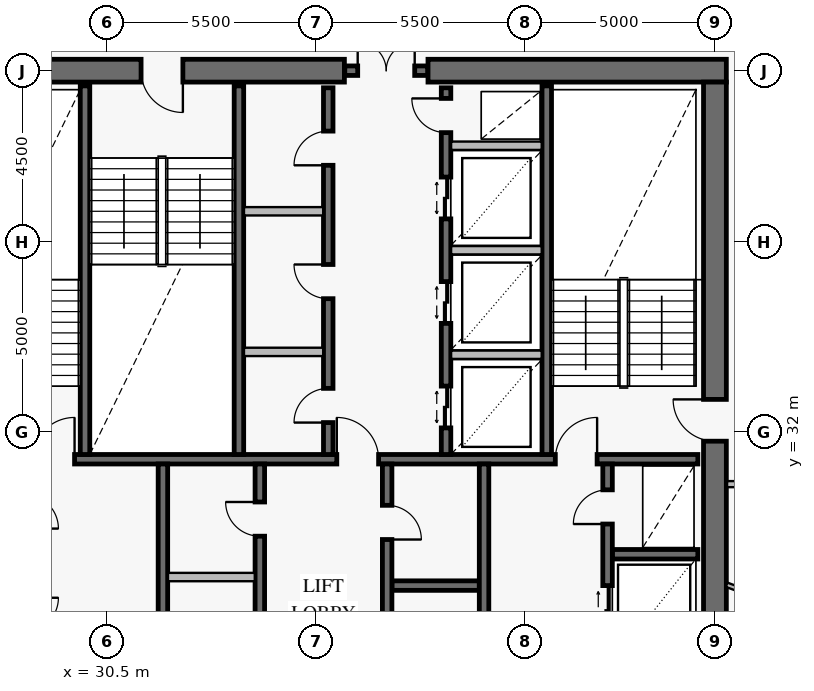
"""IFC4 building model, lengths in metres.
Left out: names, types, materials, properties, quantities, classifications, styles, units other than length and angle.
Written with IfcOpenShell. Run it as: python <this file> out.ifc"""

import sys

from ifc_helpers import new_model, si_unit, direction, frame, frame_2d, origin, place, context, subcontext, project, spatial, rectangle, extrude, element, fill, save


model = new_model("IFC4")
c1 = context("Model", 3, precision=1e-05, world=origin(), true_north=direction((0.0, 1.0)))
c2 = subcontext(c1, "Body", "Model", "MODEL_VIEW")
j1 = project(units=[si_unit("LENGTHUNIT", "METRE"), si_unit("PLANEANGLEUNIT", "RADIAN")], contexts=[c1])
p1 = place(None, origin())
s1 = spatial("IfcSite", under=j1, at=p1, CompositionType="ELEMENT")
p2 = place(p1, origin())
s2 = spatial("IfcBuilding", under=s1, at=p2, CompositionType="ELEMENT")
p3 = place(p2, frame((0.0, 0.0, 254.0)))
s3 = spatial("IfcBuildingStorey", under=s2, at=p3, CompositionType="ELEMENT", Elevation=254.0)
p4 = place(p3, frame((46.8, 41.5, 0.0), z_axis=(0.0, 0.0, 1.0), x_axis=(-1.0, 0.0, 0.0)))
e1 = element("IfcWall", 1, at=p4, inside=s3, PredefinedType="SHEAR", context=c2, shape_type="SweptSolid", body=[
    extrude(rectangle(XDim=7.85, YDim=0.6, at=frame_2d((3.925, 0.0))), origin(), (0.0, 0.0, 1.0), 3.8),
])
p5 = place(p3, frame((36.75, 41.5, 0.0), z_axis=(0.0, 0.0, 1.0), x_axis=(-1.0, 0.0, 0.0)))
e2 = element("IfcWall", 2, at=p5, inside=s3, PredefinedType="SHEAR", context=c2, shape_type="SweptSolid", body=[
    extrude(rectangle(XDim=11.55, YDim=0.6, at=frame_2d((5.775, 0.0))), origin(), (0.0, 0.0, 1.0), 3.8),
])
p6 = place(p5, frame((4.25, 0.0, 0.0)))
e3 = element("IfcOpeningElement", 3, at=p6, cuts=e2, PredefinedType="OPENING", context=c2, shape_type="SweptSolid", body=[
    extrude(rectangle(XDim=1.1, YDim=2.15, at=frame_2d((0.55, 1.075))), frame((0.0, 0.312, 0.0), z_axis=(0.0, -1.0, 0.0), x_axis=(1.0, 0.0, 0.0)), (0.0, 0.0, 1.0), 0.624),
])
p7 = place(p3, frame((46.5, 22.8, 0.0), z_axis=(0.0, 0.0, 1.0), x_axis=(0.0, 1.0, 0.0)))
e4 = element("IfcWall", 4, at=p7, inside=s3, PredefinedType="SHEAR", context=c2, shape_type="SweptSolid", body=[
    extrude(rectangle(XDim=18.4, YDim=0.6, at=frame_2d((9.2, 0.0))), origin(), (0.0, 0.0, 1.0), 3.8),
])
p8 = place(p7, frame((8.95, 0.0, 0.0)))
e5 = element("IfcOpeningElement", 5, at=p8, cuts=e4, PredefinedType="OPENING", context=c2, shape_type="SweptSolid", body=[
    extrude(rectangle(XDim=1.1, YDim=2.15, at=frame_2d((0.55, 1.075))), frame((0.0, 0.312, 0.0), z_axis=(0.0, -1.0, 0.0), x_axis=(1.0, 0.0, 0.0)), (0.0, 0.0, 1.0), 0.624),
])
p9 = place(p3, frame((36.76, 41.5, 0.0), z_axis=(0.0, 0.0, 1.0), x_axis=(1.0, 0.0, 0.0)))
e6 = element("IfcWall", 6, at=p9, inside=s3, PredefinedType="SOLIDWALL", context=c2, shape_type="SweptSolid", body=[
    extrude(rectangle(XDim=2.18, YDim=0.25, at=frame_2d((1.09, 0.0))), origin(), (0.0, 0.0, 1.0), 3.8),
])
p10 = place(p9, frame((0.34, 0.0, 0.0)))
e7 = element("IfcOpeningElement", 7, at=p10, cuts=e6, PredefinedType="OPENING", context=c2, shape_type="SweptSolid", body=[
    extrude(rectangle(XDim=1.5, YDim=2.15, at=frame_2d((0.75, 1.075))), frame((0.0, 0.137, 0.0), z_axis=(0.0, -1.0, 0.0), x_axis=(1.0, 0.0, 0.0)), (0.0, 0.0, 1.0), 0.274),
])
p11 = place(p3, frame((25.95, 31.275, 0.0), z_axis=(0.0, 0.0, 1.0), x_axis=(1.0, 0.0, 0.0)))
e8 = element("IfcWall", 8, at=p11, inside=s3, PredefinedType="SOLIDWALL", context=c2, shape_type="SweptSolid", body=[
    extrude(rectangle(XDim=20.1, YDim=0.25, at=frame_2d((10.05, 0.0))), origin(), (0.0, 0.0, 1.0), 3.8),
])
p12 = place(p11, frame((2.6, 0.0, 0.0)))
e9 = element("IfcOpeningElement", 9, at=p12, cuts=e8, PredefinedType="OPENING", context=c2, shape_type="SweptSolid", body=[
    extrude(rectangle(XDim=1.1, YDim=2.15, at=frame_2d((0.55, 1.075))), frame((0.0, 0.137, 0.0), z_axis=(0.0, -1.0, 0.0), x_axis=(1.0, 0.0, 0.0)), (0.0, 0.0, 1.0), 0.274),
])
p13 = place(p11, frame((10.6, 0.0, 0.0)))
e10 = element("IfcOpeningElement", 10, at=p13, cuts=e8, PredefinedType="OPENING", context=c2, shape_type="SweptSolid", body=[
    extrude(rectangle(XDim=1.1, YDim=2.15, at=frame_2d((0.55, 1.075))), frame((0.0, 0.137, 0.0), z_axis=(0.0, -1.0, 0.0), x_axis=(1.0, 0.0, 0.0)), (0.0, 0.0, 1.0), 0.274),
])
p14 = place(p11, frame((16.35, 0.0, 0.0)))
e11 = element("IfcOpeningElement", 11, at=p14, cuts=e8, PredefinedType="OPENING", context=c2, shape_type="SweptSolid", body=[
    extrude(rectangle(XDim=1.1, YDim=2.15, at=frame_2d((0.55, 1.075))), frame((0.0, 0.137, 0.0), z_axis=(0.0, -1.0, 0.0), x_axis=(1.0, 0.0, 0.0)), (0.0, 0.0, 1.0), 0.274),
])
for number, where, z_axis, x_axis in (
    (12, (29.925, 31.4, 0.0), (0.0, 0.0, 1.0), (0.0, 1.0, 0.0)),
    (13, (33.975, 31.4, 0.0), (0.0, 0.0, 1.0), (0.0, 1.0, 0.0)),
    (14, (42.075, 31.4, 0.0), (0.0, 0.0, 1.0), (0.0, 1.0, 0.0)),
):
    element("IfcWall", number, at=place(p3, frame(where, z_axis=z_axis, x_axis=x_axis)), inside=s3, PredefinedType="SOLIDWALL", context=c2, shape_type="SweptSolid", body=[
        extrude(rectangle(XDim=9.7, YDim=0.25, at=frame_2d((4.85, 0.0))), origin(), (0.0, 0.0, 1.0), 3.8),
    ])
p15 = place(p3, frame((36.325, 31.4, 0.0), z_axis=(0.0, 0.0, 1.0), x_axis=(0.0, 1.0, 0.0)))
e15 = element("IfcWall", 15, at=p15, inside=s3, PredefinedType="SOLIDWALL", context=c2, shape_type="SweptSolid", body=[
    extrude(rectangle(XDim=9.65, YDim=0.25, at=frame_2d((4.825, 0.0))), origin(), (0.0, 0.0, 1.0), 3.8),
])
p16 = place(p15, frame((0.84, 0.0, 0.0)))
e16 = element("IfcOpeningElement", 16, at=p16, cuts=e15, PredefinedType="OPENING", context=c2, shape_type="SweptSolid", body=[
    extrude(rectangle(XDim=0.9, YDim=2.1, at=frame_2d((0.45, 1.05))), frame((0.0, 0.137, 0.0), z_axis=(0.0, -1.0, 0.0), x_axis=(1.0, 0.0, 0.0)), (0.0, 0.0, 1.0), 0.274),
])
p17 = place(p15, frame((4.1, 0.0, 0.0)))
e17 = element("IfcOpeningElement", 17, at=p17, cuts=e15, PredefinedType="OPENING", context=c2, shape_type="SweptSolid", body=[
    extrude(rectangle(XDim=0.9, YDim=2.1, at=frame_2d((0.45, 1.05))), frame((0.0, 0.137, 0.0), z_axis=(0.0, -1.0, 0.0), x_axis=(1.0, 0.0, 0.0)), (0.0, 0.0, 1.0), 0.274),
])
p18 = place(p15, frame((7.61, 0.0, 0.0)))
e18 = element("IfcOpeningElement", 18, at=p18, cuts=e15, PredefinedType="OPENING", context=c2, shape_type="SweptSolid", body=[
    extrude(rectangle(XDim=0.9, YDim=2.1, at=frame_2d((0.45, 1.05))), frame((0.0, 0.137, 0.0), z_axis=(0.0, -1.0, 0.0), x_axis=(1.0, 0.0, 0.0)), (0.0, 0.0, 1.0), 0.274),
])
p19 = place(p3, frame((39.425, 31.4, 0.0), z_axis=(0.0, 0.0, 1.0), x_axis=(0.0, 1.0, 0.0)))
e19 = element("IfcWall", 19, at=p19, inside=s3, PredefinedType="SOLIDWALL", context=c2, shape_type="SweptSolid", body=[
    extrude(rectangle(XDim=9.65, YDim=0.25, at=frame_2d((4.825, 0.0))), origin(), (0.0, 0.0, 1.0), 3.8),
])
p20 = place(p19, frame((0.7, 0.0, 0.0)))
e20 = element("IfcOpeningElement", 20, at=p20, cuts=e19, PredefinedType="OPENING", context=c2, shape_type="SweptSolid", body=[
    extrude(rectangle(XDim=1.1, YDim=2.2, at=frame_2d((0.55, 1.1))), frame((0.0, 0.137, 0.0), z_axis=(0.0, -1.0, 0.0), x_axis=(1.0, 0.0, 0.0)), (0.0, 0.0, 1.0), 0.274),
])
p21 = place(p19, frame((3.45, 0.0, 0.0)))
e21 = element("IfcOpeningElement", 21, at=p21, cuts=e19, PredefinedType="OPENING", context=c2, shape_type="SweptSolid", body=[
    extrude(rectangle(XDim=1.1, YDim=2.2, at=frame_2d((0.55, 1.1))), frame((0.0, 0.137, 0.0), z_axis=(0.0, -1.0, 0.0), x_axis=(1.0, 0.0, 0.0)), (0.0, 0.0, 1.0), 0.274),
])
p22 = place(p19, frame((6.2, 0.0, 0.0)))
e22 = element("IfcOpeningElement", 22, at=p22, cuts=e19, PredefinedType="OPENING", context=c2, shape_type="SweptSolid", body=[
    extrude(rectangle(XDim=1.1, YDim=2.2, at=frame_2d((0.55, 1.1))), frame((0.0, 0.137, 0.0), z_axis=(0.0, -1.0, 0.0), x_axis=(1.0, 0.0, 0.0)), (0.0, 0.0, 1.0), 0.274),
])
p23 = place(p19, frame((8.47, 0.0, 0.0)))
e23 = element("IfcOpeningElement", 23, at=p23, cuts=e19, PredefinedType="OPENING", context=c2, shape_type="SweptSolid", body=[
    extrude(rectangle(XDim=0.9, YDim=2.1, at=frame_2d((0.45, 1.05))), frame((0.0, 0.137, 0.0), z_axis=(0.0, -1.0, 0.0), x_axis=(1.0, 0.0, 0.0)), (0.0, 0.0, 1.0), 0.274),
])
p24 = place(p3, frame((31.975, 22.95, 0.0), z_axis=(0.0, 0.0, 1.0), x_axis=(0.0, 1.0, 0.0)))
e24 = element("IfcWall", 24, at=p24, inside=s3, PredefinedType="SOLIDWALL", context=c2, shape_type="SweptSolid", body=[
    extrude(rectangle(XDim=8.2, YDim=0.25, at=frame_2d((4.1, 0.0))), origin(), (0.0, 0.0, 1.0), 3.8),
])
p25 = place(p3, frame((34.525, 22.95, 0.0), z_axis=(0.0, 0.0, 1.0), x_axis=(0.0, 1.0, 0.0)))
e25 = element("IfcWall", 25, at=p25, inside=s3, PredefinedType="SOLIDWALL", context=c2, shape_type="SweptSolid", body=[
    extrude(rectangle(XDim=8.2, YDim=0.25, at=frame_2d((4.1, 0.0))), origin(), (0.0, 0.0, 1.0), 3.8),
])
p26 = place(p25, frame((2.1, 0.0, 0.0)))
e26 = element("IfcOpeningElement", 26, at=p26, cuts=e25, PredefinedType="OPENING", context=c2, shape_type="SweptSolid", body=[
    extrude(rectangle(XDim=0.9, YDim=2.1, at=frame_2d((0.45, 1.05))), frame((0.0, 0.137, 0.0), z_axis=(0.0, -1.0, 0.0), x_axis=(1.0, 0.0, 0.0)), (0.0, 0.0, 1.0), 0.274),
])
p27 = place(p25, frame((6.3, 0.0, 0.0)))
e27 = element("IfcOpeningElement", 27, at=p27, cuts=e25, PredefinedType="OPENING", context=c2, shape_type="SweptSolid", body=[
    extrude(rectangle(XDim=0.9, YDim=2.1, at=frame_2d((0.45, 1.05))), frame((0.0, 0.137, 0.0), z_axis=(0.0, -1.0, 0.0), x_axis=(1.0, 0.0, 0.0)), (0.0, 0.0, 1.0), 0.274),
])
p28 = place(p3, frame((38.0, 27.95, 0.0), z_axis=(0.0, 0.0, 1.0), x_axis=(1.0, 0.0, 0.0)))
e28 = element("IfcWall", 28, at=p28, inside=s3, PredefinedType="SOLIDWALL", context=c2, shape_type="SweptSolid", body=[
    extrude(rectangle(XDim=2.3, YDim=0.25, at=frame_2d((1.15, 0.0))), origin(), (0.0, 0.0, 1.0), 3.8),
])
p29 = place(p3, frame((37.875, 22.95, 0.0), z_axis=(0.0, 0.0, 1.0), x_axis=(0.0, 1.0, 0.0)))
e29 = element("IfcWall", 29, at=p29, inside=s3, PredefinedType="SOLIDWALL", context=c2, shape_type="SweptSolid", body=[
    extrude(rectangle(XDim=8.2, YDim=0.25, at=frame_2d((4.1, 0.0))), origin(), (0.0, 0.0, 1.0), 3.8),
])
p30 = place(p29, frame((2.012, 0.0, 0.0)))
e30 = element("IfcOpeningElement", 30, at=p30, cuts=e29, PredefinedType="OPENING", context=c2, shape_type="SweptSolid", body=[
    extrude(rectangle(XDim=0.9, YDim=2.1, at=frame_2d((0.45, 1.05))), frame((0.0, 0.137, 0.0), z_axis=(0.0, -1.0, 0.0), x_axis=(1.0, 0.0, 0.0)), (0.0, 0.0, 1.0), 0.274),
])
p31 = place(p29, frame((6.212, 0.0, 0.0)))
e31 = element("IfcOpeningElement", 31, at=p31, cuts=e29, PredefinedType="OPENING", context=c2, shape_type="SweptSolid", body=[
    extrude(rectangle(XDim=0.9, YDim=2.1, at=frame_2d((0.45, 1.05))), frame((0.0, 0.137, 0.0), z_axis=(0.0, -1.0, 0.0), x_axis=(1.0, 0.0, 0.0)), (0.0, 0.0, 1.0), 0.274),
])
p32 = place(p3, frame((40.425, 22.95, 0.0), z_axis=(0.0, 0.0, 1.0), x_axis=(0.0, 1.0, 0.0)))
e32 = element("IfcWall", 32, at=p32, inside=s3, PredefinedType="SOLIDWALL", context=c2, shape_type="SweptSolid", body=[
    extrude(rectangle(XDim=8.2, YDim=0.25, at=frame_2d((4.1, 0.0))), origin(), (0.0, 0.0, 1.0), 3.8),
])
p33 = place(p3, frame((43.8, 28.775, 0.0), z_axis=(0.0, 0.0, 1.0), x_axis=(1.0, 0.0, 0.0)))
e33 = element("IfcWall", 33, at=p33, inside=s3, PredefinedType="SOLIDWALL", context=c2, shape_type="SweptSolid", body=[
    extrude(rectangle(XDim=2.25, YDim=0.25, at=frame_2d((1.125, 0.0))), origin(), (0.0, 0.0, 1.0), 3.8),
])
p34 = place(p3, frame((43.675, 22.95, 0.0), z_axis=(0.0, 0.0, 1.0), x_axis=(0.0, 1.0, 0.0)))
e34 = element("IfcWall", 34, at=p34, inside=s3, PredefinedType="SOLIDWALL", context=c2, shape_type="SweptSolid", body=[
    extrude(rectangle(XDim=8.2, YDim=0.25, at=frame_2d((4.1, 0.0))), origin(), (0.0, 0.0, 1.0), 3.8),
])
p35 = place(p34, frame((0.75, 0.0, 0.0)))
e35 = element("IfcOpeningElement", 35, at=p35, cuts=e34, PredefinedType="OPENING", context=c2, shape_type="SweptSolid", body=[
    extrude(rectangle(XDim=1.3, YDim=2.3, at=frame_2d((0.65, 1.15))), frame((0.0, 0.137, 0.0), z_axis=(0.0, -1.0, 0.0), x_axis=(1.0, 0.0, 0.0)), (0.0, 0.0, 1.0), 0.274),
])
p36 = place(p34, frame((3.7, 0.0, 0.0)))
e36 = element("IfcOpeningElement", 36, at=p36, cuts=e34, PredefinedType="OPENING", context=c2, shape_type="SweptSolid", body=[
    extrude(rectangle(XDim=1.3, YDim=2.3, at=frame_2d((0.65, 1.15))), frame((0.0, 0.137, 0.0), z_axis=(0.0, -1.0, 0.0), x_axis=(1.0, 0.0, 0.0)), (0.0, 0.0, 1.0), 0.274),
])
p37 = place(p34, frame((6.62, 0.0, 0.0)))
e37 = element("IfcOpeningElement", 37, at=p37, cuts=e34, PredefinedType="OPENING", context=c2, shape_type="SweptSolid", body=[
    extrude(rectangle(XDim=0.9, YDim=2.1, at=frame_2d((0.45, 1.05))), frame((0.0, 0.137, 0.0), z_axis=(0.0, -1.0, 0.0), x_axis=(1.0, 0.0, 0.0)), (0.0, 0.0, 1.0), 0.274),
])
p38 = place(p3, frame((46.808, 27.972, 0.0), z_axis=(0.0, 0.0, 1.0), x_axis=(0.937036038674, -0.349232676344, 0.0)))
e38 = element("IfcWall", 38, at=p38, inside=s3, PredefinedType="PARTITIONING", context=c2, shape_type="SweptSolid", body=[
    extrude(rectangle(XDim=4.657, YDim=0.12, at=frame_2d((2.329, 0.0))), origin(), (0.0, 0.0, 1.0), 3.55),
])
p39 = place(p38, frame((1.487, 0.0, 0.0)))
e39 = element("IfcOpeningElement", 39, at=p39, cuts=e38, PredefinedType="OPENING", context=c2, shape_type="SweptSolid", body=[
    extrude(rectangle(XDim=0.9, YDim=2.1, at=frame_2d((0.45, 1.05))), frame((0.0, 0.072, 0.0), z_axis=(0.0, -1.0, 0.0), x_axis=(1.0, 0.0, 0.0)), (0.0, 0.0, 1.0), 0.144),
])
p40 = place(p3, frame((46.82, 30.62, 0.0), z_axis=(0.0, 0.0, 1.0), x_axis=(1.0, 0.0, 0.0)))
e40 = element("IfcWall", 40, at=p40, inside=s3, PredefinedType="PARTITIONING", context=c2, shape_type="SweptSolid", body=[
    extrude(rectangle(XDim=2.03, YDim=0.16, at=frame_2d((1.015, 0.0))), origin(), (0.0, 0.0, 1.0), 3.55),
])
p41 = place(p40, frame((0.49, 0.0, 0.0)))
e41 = element("IfcOpeningElement", 41, at=p41, cuts=e40, PredefinedType="OPENING", context=c2, shape_type="SweptSolid", body=[
    extrude(rectangle(XDim=1.05, YDim=2.15, at=frame_2d((0.525, 1.075))), frame((0.0, 0.092, 0.0), z_axis=(0.0, -1.0, 0.0), x_axis=(1.0, 0.0, 0.0)), (0.0, 0.0, 1.0), 0.184),
])
for number, where, z_axis, x_axis in (
    (42, (34.108, 34.1, 0.0), (0.0, 0.0, 1.0), (1.0, 0.0, 0.0)),
    (43, (34.108, 37.8, 0.0), (0.0, 0.0, 1.0), (1.0, 0.0, 0.0)),
):
    element("IfcWall", number, at=place(p3, frame(where, z_axis=z_axis, x_axis=x_axis)), inside=s3, PredefinedType="PARTITIONING", context=c2, shape_type="SweptSolid", body=[
        extrude(rectangle(XDim=2.084, YDim=0.22, at=frame_2d((1.042, 0.0))), origin(), (0.0, 0.0, 1.0), 3.55),
    ])
for number, where, z_axis, x_axis in (
    (44, (39.558, 34.025, 0.0), (0.0, 0.0, 1.0), (1.0, 0.0, 0.0)),
    (45, (39.558, 36.775, 0.0), (0.0, 0.0, 1.0), (1.0, 0.0, 0.0)),
    (46, (39.558, 39.525, 0.0), (0.0, 0.0, 1.0), (1.0, 0.0, 0.0)),
):
    element("IfcWall", number, at=place(p3, frame(where, z_axis=z_axis, x_axis=x_axis)), inside=s3, PredefinedType="PARTITIONING", context=c2, shape_type="SweptSolid", body=[
        extrude(rectangle(XDim=2.384, YDim=0.22, at=frame_2d((1.192, 0.0))), origin(), (0.0, 0.0, 1.0), 3.55),
    ])
p42 = place(p3, frame((32.108, 28.175, 0.0), z_axis=(0.0, 0.0, 1.0), x_axis=(1.0, 0.0, 0.0)))
e47 = element("IfcWall", 47, at=p42, inside=s3, PredefinedType="PARTITIONING", context=c2, shape_type="SweptSolid", body=[
    extrude(rectangle(XDim=2.284, YDim=0.22, at=frame_2d((1.142, 0.0))), origin(), (0.0, 0.0, 1.0), 3.55),
])
p43 = place(p8, origin())
e48 = element("IfcDoor", 48, at=p43, inside=s3, OperationType="SINGLE_SWING_RIGHT", PredefinedType="USERDEFINED", context=c2, shape_type="SweptSolid", body=[
    extrude(rectangle(XDim=1.1, YDim=2.15, at=frame_2d((0.55, 1.075))), frame((0.0, 0.025, 0.0), z_axis=(0.0, -1.0, 0.0), x_axis=(1.0, 0.0, 0.0)), (0.0, 0.0, 1.0), 0.05),
])
fill(e5, e48)
p44 = place(p6, origin())
e49 = element("IfcDoor", 49, at=p44, inside=s3, OperationType="SINGLE_SWING_LEFT", PredefinedType="USERDEFINED", context=c2, shape_type="SweptSolid", body=[
    extrude(rectangle(XDim=1.1, YDim=2.15, at=frame_2d((0.55, 1.075))), frame((0.0, 0.025, 0.0), z_axis=(0.0, -1.0, 0.0), x_axis=(1.0, 0.0, 0.0)), (0.0, 0.0, 1.0), 0.05),
])
fill(e3, e49)
p45 = place(p10, origin())
e50 = element("IfcDoor", 50, at=p45, inside=s3, OperationType="DOUBLE_DOOR_SINGLE_SWING", PredefinedType="DOOR", context=c2, shape_type="SweptSolid", body=[
    extrude(rectangle(XDim=1.5, YDim=2.15, at=frame_2d((0.75, 1.075))), frame((0.0, 0.025, 0.0), z_axis=(0.0, -1.0, 0.0), x_axis=(1.0, 0.0, 0.0)), (0.0, 0.0, 1.0), 0.05),
])
fill(e7, e50)
p46 = place(p12, origin())
e51 = element("IfcDoor", 51, at=p46, inside=s3, OperationType="SINGLE_SWING_RIGHT", PredefinedType="USERDEFINED", context=c2, shape_type="SweptSolid", body=[
    extrude(rectangle(XDim=1.1, YDim=2.15, at=frame_2d((0.55, 1.075))), frame((0.0, 0.025, 0.0), z_axis=(0.0, -1.0, 0.0), x_axis=(1.0, 0.0, 0.0)), (0.0, 0.0, 1.0), 0.05),
])
fill(e9, e51)
p47 = place(p13, origin())
e52 = element("IfcDoor", 52, at=p47, inside=s3, OperationType="SINGLE_SWING_LEFT", PredefinedType="USERDEFINED", context=c2, shape_type="SweptSolid", body=[
    extrude(rectangle(XDim=1.1, YDim=2.15, at=frame_2d((0.55, 1.075))), frame((0.0, 0.025, 0.0), z_axis=(0.0, -1.0, 0.0), x_axis=(1.0, 0.0, 0.0)), (0.0, 0.0, 1.0), 0.05),
])
fill(e10, e52)
p48 = place(p14, origin())
e53 = element("IfcDoor", 53, at=p48, inside=s3, OperationType="SINGLE_SWING_RIGHT", PredefinedType="USERDEFINED", context=c2, shape_type="SweptSolid", body=[
    extrude(rectangle(XDim=1.1, YDim=2.15, at=frame_2d((0.55, 1.075))), frame((0.0, 0.025, 0.0), z_axis=(0.0, -1.0, 0.0), x_axis=(1.0, 0.0, 0.0)), (0.0, 0.0, 1.0), 0.05),
])
fill(e11, e53)
p49 = place(p16, origin())
e54 = element("IfcDoor", 54, at=p49, inside=s3, OperationType="SINGLE_SWING_LEFT", PredefinedType="DOOR", context=c2, shape_type="SweptSolid", body=[
    extrude(rectangle(XDim=0.9, YDim=2.1, at=frame_2d((0.45, 1.05))), frame((0.0, 0.025, 0.0), z_axis=(0.0, -1.0, 0.0), x_axis=(1.0, 0.0, 0.0)), (0.0, 0.0, 1.0), 0.05),
])
fill(e16, e54)
p50 = place(p17, origin())
e55 = element("IfcDoor", 55, at=p50, inside=s3, OperationType="SINGLE_SWING_RIGHT", PredefinedType="DOOR", context=c2, shape_type="SweptSolid", body=[
    extrude(rectangle(XDim=0.9, YDim=2.1, at=frame_2d((0.45, 1.05))), frame((0.0, 0.025, 0.0), z_axis=(0.0, -1.0, 0.0), x_axis=(1.0, 0.0, 0.0)), (0.0, 0.0, 1.0), 0.05),
])
fill(e17, e55)
p51 = place(p18, origin())
e56 = element("IfcDoor", 56, at=p51, inside=s3, OperationType="SINGLE_SWING_LEFT", PredefinedType="DOOR", context=c2, shape_type="SweptSolid", body=[
    extrude(rectangle(XDim=0.9, YDim=2.1, at=frame_2d((0.45, 1.05))), frame((0.0, 0.025, 0.0), z_axis=(0.0, -1.0, 0.0), x_axis=(1.0, 0.0, 0.0)), (0.0, 0.0, 1.0), 0.05),
])
fill(e18, e56)
p52 = place(p20, origin())
e57 = element("IfcDoor", 57, at=p52, inside=s3, OperationType="DOUBLE_DOOR_SLIDING", PredefinedType="DOOR", context=c2, shape_type="SweptSolid", body=[
    extrude(rectangle(XDim=1.1, YDim=2.2, at=frame_2d((0.55, 1.1))), frame((0.0, 0.025, 0.0), z_axis=(0.0, -1.0, 0.0), x_axis=(1.0, 0.0, 0.0)), (0.0, 0.0, 1.0), 0.05),
])
fill(e20, e57)
p53 = place(p21, origin())
e58 = element("IfcDoor", 58, at=p53, inside=s3, OperationType="DOUBLE_DOOR_SLIDING", PredefinedType="DOOR", context=c2, shape_type="SweptSolid", body=[
    extrude(rectangle(XDim=1.1, YDim=2.2, at=frame_2d((0.55, 1.1))), frame((0.0, 0.025, 0.0), z_axis=(0.0, -1.0, 0.0), x_axis=(1.0, 0.0, 0.0)), (0.0, 0.0, 1.0), 0.05),
])
fill(e21, e58)
p54 = place(p22, origin())
e59 = element("IfcDoor", 59, at=p54, inside=s3, OperationType="DOUBLE_DOOR_SLIDING", PredefinedType="DOOR", context=c2, shape_type="SweptSolid", body=[
    extrude(rectangle(XDim=1.1, YDim=2.2, at=frame_2d((0.55, 1.1))), frame((0.0, 0.025, 0.0), z_axis=(0.0, -1.0, 0.0), x_axis=(1.0, 0.0, 0.0)), (0.0, 0.0, 1.0), 0.05),
])
fill(e22, e59)
p55 = place(p23, origin())
e60 = element("IfcDoor", 60, at=p55, inside=s3, OperationType="SINGLE_SWING_RIGHT", PredefinedType="DOOR", context=c2, shape_type="SweptSolid", body=[
    extrude(rectangle(XDim=0.9, YDim=2.1, at=frame_2d((0.45, 1.05))), frame((0.0, 0.025, 0.0), z_axis=(0.0, -1.0, 0.0), x_axis=(1.0, 0.0, 0.0)), (0.0, 0.0, 1.0), 0.05),
])
fill(e23, e60)
p56 = place(p27, origin())
e61 = element("IfcDoor", 61, at=p56, inside=s3, OperationType="SINGLE_SWING_RIGHT", PredefinedType="DOOR", context=c2, shape_type="SweptSolid", body=[
    extrude(rectangle(XDim=0.9, YDim=2.1, at=frame_2d((0.45, 1.05))), frame((0.0, 0.025, 0.0), z_axis=(0.0, -1.0, 0.0), x_axis=(1.0, 0.0, 0.0)), (0.0, 0.0, 1.0), 0.05),
])
fill(e27, e61)
p57 = place(p31, frame((0.9, 0.0, 0.0), z_axis=(0.0, 0.0, 1.0), x_axis=(-1.0, 0.0, 0.0)))
e62 = element("IfcDoor", 62, at=p57, inside=s3, OperationType="SINGLE_SWING_RIGHT", PredefinedType="DOOR", context=c2, shape_type="SweptSolid", body=[
    extrude(rectangle(XDim=0.9, YDim=2.1, at=frame_2d((0.45, 1.05))), frame((0.0, 0.025, 0.0), z_axis=(0.0, -1.0, 0.0), x_axis=(1.0, 0.0, 0.0)), (0.0, 0.0, 1.0), 0.05),
])
fill(e31, e62)
p58 = place(p36, origin())
e63 = element("IfcDoor", 63, at=p58, inside=s3, OperationType="DOUBLE_DOOR_SLIDING", PredefinedType="DOOR", context=c2, shape_type="SweptSolid", body=[
    extrude(rectangle(XDim=1.3, YDim=2.3, at=frame_2d((0.65, 1.15))), frame((0.0, 0.025, 0.0), z_axis=(0.0, -1.0, 0.0), x_axis=(1.0, 0.0, 0.0)), (0.0, 0.0, 1.0), 0.05),
])
fill(e36, e63)
p59 = place(p37, origin())
e64 = element("IfcDoor", 64, at=p59, inside=s3, OperationType="SINGLE_SWING_LEFT", PredefinedType="DOOR", context=c2, shape_type="SweptSolid", body=[
    extrude(rectangle(XDim=0.9, YDim=2.1, at=frame_2d((0.45, 1.05))), frame((0.0, 0.025, 0.0), z_axis=(0.0, -1.0, 0.0), x_axis=(1.0, 0.0, 0.0)), (0.0, 0.0, 1.0), 0.05),
])
fill(e37, e64)
save(model, sys.argv[1])
